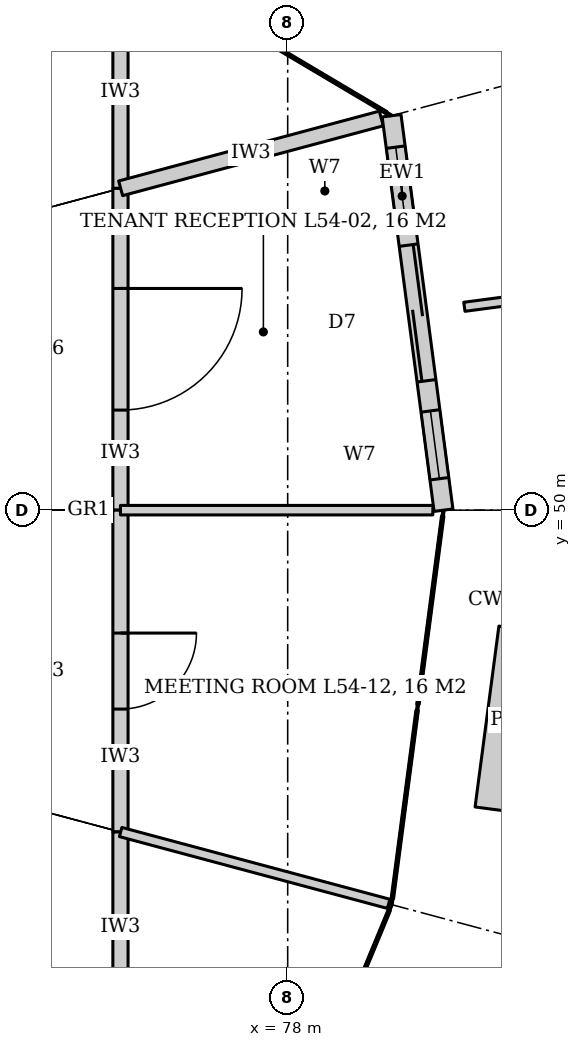
"""IFC4 building model, lengths in metres.
Left out: names, types, materials, properties, quantities, classifications, styles, units other than length and angle.
Written with IfcOpenShell. Run it as: python <this file> out.ifc"""

import sys

from ifc_helpers import new_model, si_unit, direction, frame, frame_2d, origin, place, context, subcontext, project, spatial, rectangle, extrude, element, fill, save


model = new_model("IFC4")
c1 = context("Model", 3, precision=1e-05, world=origin(), true_north=direction((0.0, 1.0)))
c2 = subcontext(c1, "Body", "Model", "MODEL_VIEW")
j1 = project(units=[si_unit("LENGTHUNIT", "METRE"), si_unit("PLANEANGLEUNIT", "RADIAN")], contexts=[c1])
p1 = place(None, origin())
s1 = spatial("IfcSite", under=j1, at=p1, CompositionType="ELEMENT")
p2 = place(p1, origin())
s2 = spatial("IfcBuilding", under=s1, at=p2, CompositionType="ELEMENT")
p3 = place(p2, frame((0.0, 0.0, 227.6)))
s3 = spatial("IfcBuildingStorey", under=s2, at=p3, CompositionType="ELEMENT", Elevation=227.6)
p4 = place(p3, frame((75.8, 58.8, 0.0), z_axis=(0.0, 0.0, 1.0), x_axis=(0.0, -1.0, 0.0)))
e1 = element("IfcWall", 1, at=p4, inside=s3, PredefinedType="PARTITIONING", context=c2, shape_type="SweptSolid", body=[
    extrude(rectangle(XDim=4.566, YDim=0.2, at=frame_2d((2.283, 0.0))), origin(), (0.0, 0.0, 1.0), 3.02),
])
p5 = place(p3, frame((75.8, 54.234, 0.0), z_axis=(0.0, 0.0, 1.0), x_axis=(0.0, -1.0, 0.0)))
e2 = element("IfcWall", 2, at=p5, inside=s3, PredefinedType="PARTITIONING", context=c2, shape_type="SweptSolid", body=[
    extrude(rectangle(XDim=4.234, YDim=0.2, at=frame_2d((2.117, 0.0))), origin(), (0.0, 0.0, 1.0), 3.02),
])
p6 = place(p5, frame((1.317, 0.0, 0.0)))
e3 = element("IfcOpeningElement", 3, at=p6, cuts=e2, PredefinedType="OPENING", context=c2, shape_type="SweptSolid", body=[
    extrude(rectangle(XDim=1.6, YDim=2.4, at=frame_2d((0.8, 1.2))), frame((0.0, 0.11, 0.0), z_axis=(0.0, -1.0, 0.0), x_axis=(1.0, 0.0, 0.0)), (0.0, 0.0, 1.0), 0.22),
])
p7 = place(p3, frame((75.8, 50.0, 0.0), z_axis=(0.0, 0.0, 1.0), x_axis=(0.0, -1.0, 0.0)))
e4 = element("IfcWall", 4, at=p7, inside=s3, PredefinedType="PARTITIONING", context=c2, shape_type="SweptSolid", body=[
    extrude(rectangle(XDim=4.234, YDim=0.2, at=frame_2d((2.117, 0.0))), origin(), (0.0, 0.0, 1.0), 3.02),
])
p8 = place(p7, frame((1.617, 0.0, 0.0)))
e5 = element("IfcOpeningElement", 5, at=p8, cuts=e4, PredefinedType="OPENING", context=c2, shape_type="SweptSolid", body=[
    extrude(rectangle(XDim=1.0, YDim=2.4, at=frame_2d((0.5, 1.2))), frame((0.0, 0.11, 0.0), z_axis=(0.0, -1.0, 0.0), x_axis=(1.0, 0.0, 0.0)), (0.0, 0.0, 1.0), 0.22),
])
p9 = place(p3, frame((75.8, 45.766, 0.0), z_axis=(0.0, 0.0, 1.0), x_axis=(0.0, -1.0, 0.0)))
e6 = element("IfcWall", 6, at=p9, inside=s3, PredefinedType="PARTITIONING", context=c2, shape_type="SweptSolid", body=[
    extrude(rectangle(XDim=4.888, YDim=0.2, at=frame_2d((2.444, 0.0))), origin(), (0.0, 0.0, 1.0), 3.02),
])
p10 = place(p9, frame((1.944, 0.0, 0.0)))
e7 = element("IfcOpeningElement", 7, at=p10, cuts=e6, PredefinedType="OPENING", context=c2, shape_type="SweptSolid", body=[
    extrude(rectangle(XDim=1.0, YDim=2.1, at=frame_2d((0.5, 1.05))), frame((0.0, 0.11, 0.0), z_axis=(0.0, -1.0, 0.0), x_axis=(1.0, 0.0, 0.0)), (0.0, 0.0, 1.0), 0.22),
])
p11 = place(p3, frame((75.8, 50.0, 0.0), z_axis=(0.0, 0.0, 1.0), x_axis=(1.0, 0.0, 0.0)))
e8 = element("IfcWall", 8, at=p11, inside=s3, PredefinedType="PARTITIONING", context=c2, shape_type="SweptSolid", body=[
    extrude(rectangle(XDim=4.16, YDim=0.125, at=frame_2d((2.08, 0.0))), origin(), (0.0, 0.0, 1.0), 3.02),
])
p12 = place(p3, frame((75.802, 54.234, 0.0), z_axis=(0.0, 0.0, 1.0), x_axis=(0.96593261366, 0.258793712962, 0.0)))
e9 = element("IfcWall", 9, at=p12, inside=s3, PredefinedType="PARTITIONING", context=c2, shape_type="SweptSolid", body=[
    extrude(rectangle(XDim=3.6, YDim=0.2, at=frame_2d((1.8, 0.0))), origin(), (0.0, 0.0, 1.0), 3.02),
])
p13 = place(p3, frame((75.802, 45.766, 0.0), z_axis=(0.0, 0.0, 1.0), x_axis=(0.965934209463, -0.258787756644, 0.0)))
e10 = element("IfcWall", 10, at=p13, inside=s3, PredefinedType="PARTITIONING", context=c2, shape_type="SweptSolid", body=[
    extrude(rectangle(XDim=3.7, YDim=0.125, at=frame_2d((1.85, 0.0))), origin(), (0.0, 0.0, 1.0), 3.02),
])
p14 = place(p3, frame((80.1, 50.0, 0.0), z_axis=(0.0, 0.0, 1.0), x_axis=(-0.130560429487, 0.991440353351, 0.0)))
e11 = element("IfcWall", 11, at=p14, inside=s3, PredefinedType="SOLIDWALL", context=c2, shape_type="SweptSolid", body=[
    extrude(rectangle(XDim=5.247, YDim=0.25, at=frame_2d((2.624, 0.0))), origin(), (0.0, 0.0, 1.0), 4.04),
])
p15 = place(p14, frame((1.724, 0.0, 0.0)))
e12 = element("IfcOpeningElement", 12, at=p15, cuts=e11, PredefinedType="OPENING", context=c2, shape_type="SweptSolid", body=[
    extrude(rectangle(XDim=1.8, YDim=2.4, at=frame_2d((0.9, 1.2))), frame((0.0, 0.135, 0.0), z_axis=(0.0, -1.0, 0.0), x_axis=(1.0, 0.0, 0.0)), (0.0, 0.0, 1.0), 0.27),
])
p16 = place(p14, frame((0.424, 0.0, 0.0)))
e13 = element("IfcOpeningElement", 13, at=p16, cuts=e11, PredefinedType="OPENING", context=c2, shape_type="SweptSolid", body=[
    extrude(rectangle(XDim=0.9, YDim=2.4, at=frame_2d((0.45, 1.2))), frame((0.0, 0.135, 0.0), z_axis=(0.0, -1.0, 0.0), x_axis=(1.0, 0.0, 0.0)), (0.0, 0.0, 1.0), 0.27),
])
p17 = place(p14, frame((3.924, 0.0, 0.0)))
e14 = element("IfcOpeningElement", 14, at=p17, cuts=e11, PredefinedType="OPENING", context=c2, shape_type="SweptSolid", body=[
    extrude(rectangle(XDim=0.9, YDim=2.4, at=frame_2d((0.45, 1.2))), frame((0.0, 0.135, 0.0), z_axis=(0.0, -1.0, 0.0), x_axis=(1.0, 0.0, 0.0)), (0.0, 0.0, 1.0), 0.27),
])
p18 = place(p6, origin())
e15 = element("IfcDoor", 15, at=p18, inside=s3, OperationType="DOUBLE_DOOR_DOUBLE_SWING", PredefinedType="DOOR", context=c2, shape_type="SweptSolid", body=[
    extrude(rectangle(XDim=1.6, YDim=2.4, at=frame_2d((0.8, 1.2))), frame((0.0, 0.025, 0.0), z_axis=(0.0, -1.0, 0.0), x_axis=(1.0, 0.0, 0.0)), (0.0, 0.0, 1.0), 0.05),
])
fill(e3, e15)
p19 = place(p8, origin())
e16 = element("IfcDoor", 16, at=p19, inside=s3, OperationType="SINGLE_SWING_LEFT", PredefinedType="DOOR", context=c2, shape_type="SweptSolid", body=[
    extrude(rectangle(XDim=1.0, YDim=2.4, at=frame_2d((0.5, 1.2))), frame((0.0, 0.025, 0.0), z_axis=(0.0, -1.0, 0.0), x_axis=(1.0, 0.0, 0.0)), (0.0, 0.0, 1.0), 0.05),
])
fill(e5, e16)
p20 = place(p15, origin())
e17 = element("IfcDoor", 17, at=p20, inside=s3, OperationType="DOUBLE_DOOR_SLIDING", PredefinedType="DOOR", context=c2, shape_type="SweptSolid", body=[
    extrude(rectangle(XDim=1.8, YDim=2.4, at=frame_2d((0.9, 1.2))), frame((0.0, 0.025, 0.0), z_axis=(0.0, -1.0, 0.0), x_axis=(1.0, 0.0, 0.0)), (0.0, 0.0, 1.0), 0.05),
])
fill(e12, e17)
p21 = place(p16, origin())
e18 = element("IfcWindow", 18, at=p21, inside=s3, PartitioningType="SINGLE_PANEL", PredefinedType="WINDOW", context=c2, shape_type="SweptSolid", body=[
    extrude(rectangle(XDim=0.9, YDim=2.4, at=frame_2d((0.45, 1.2))), frame((0.0, 0.03, 0.0), z_axis=(0.0, -1.0, 0.0), x_axis=(1.0, 0.0, 0.0)), (0.0, 0.0, 1.0), 0.06),
])
fill(e13, e18)
p22 = place(p17, origin())
e19 = element("IfcWindow", 19, at=p22, inside=s3, PartitioningType="SINGLE_PANEL", PredefinedType="WINDOW", context=c2, shape_type="SweptSolid", body=[
    extrude(rectangle(XDim=0.9, YDim=2.4, at=frame_2d((0.45, 1.2))), frame((0.0, 0.03, 0.0), z_axis=(0.0, -1.0, 0.0), x_axis=(1.0, 0.0, 0.0)), (0.0, 0.0, 1.0), 0.06),
])
fill(e14, e19)
save(model, sys.argv[1])
